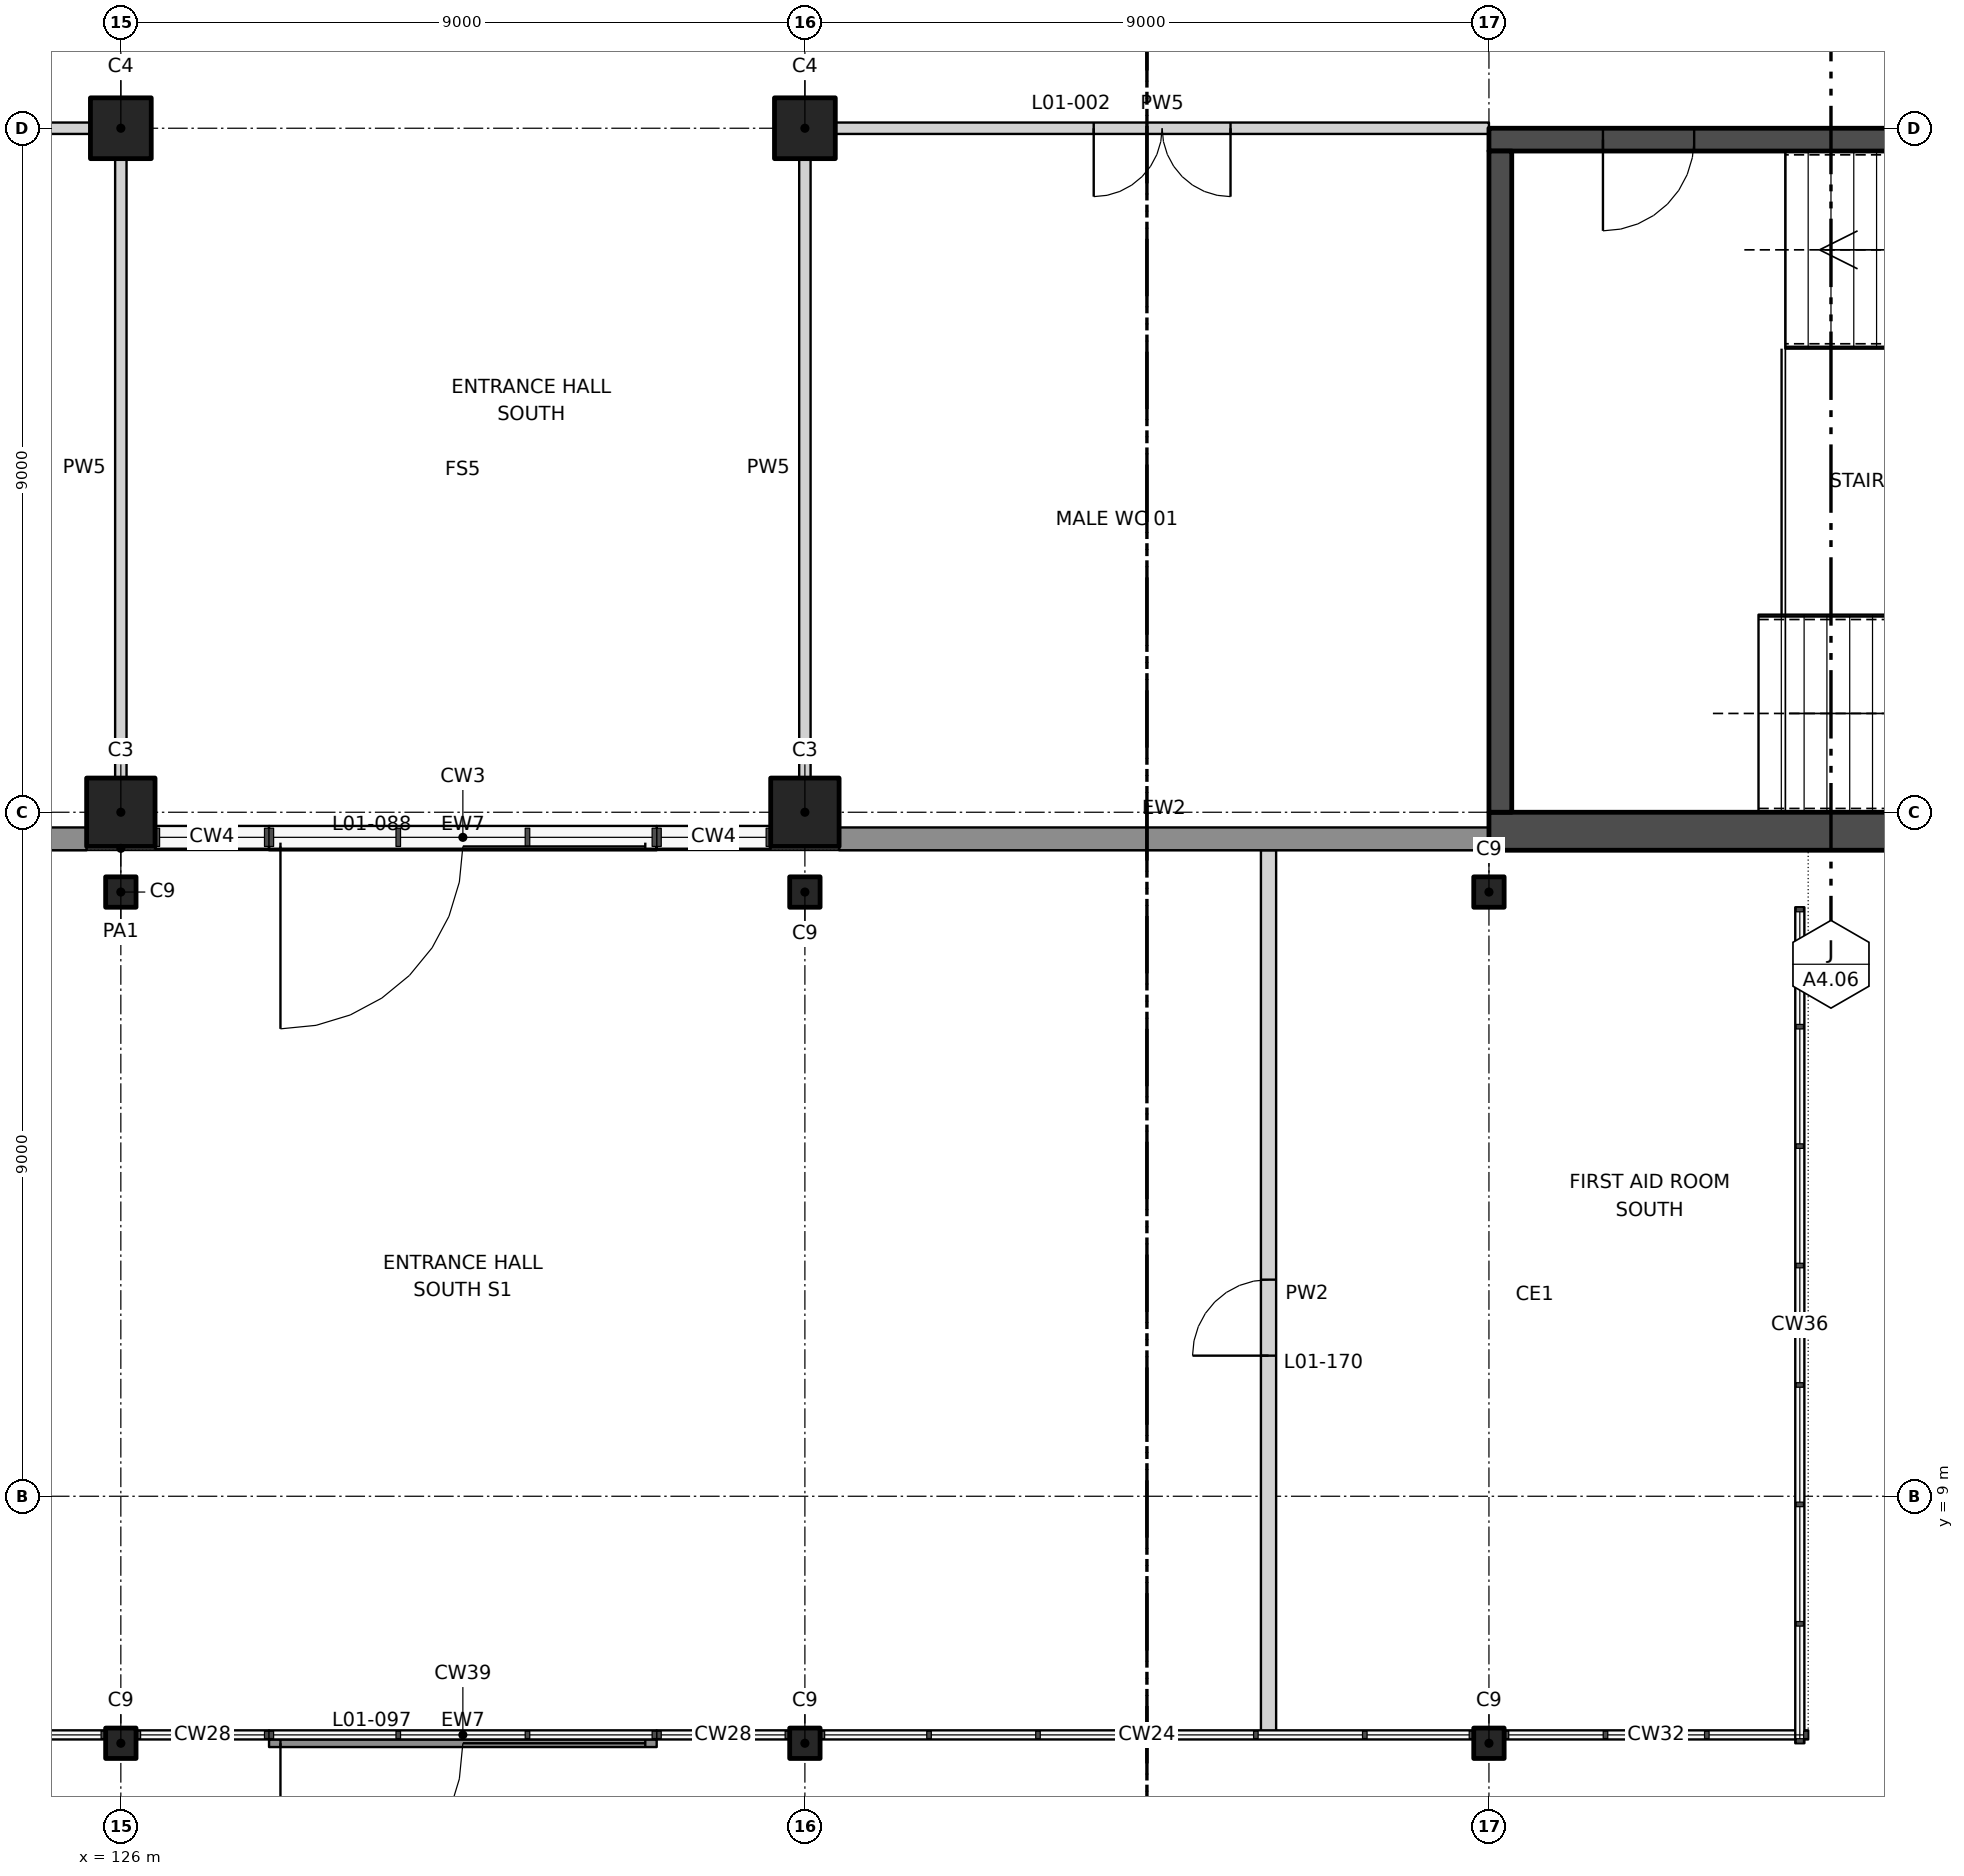
"""IFC4 building model, lengths in metres.
Left out: names, types, materials, properties, quantities, classifications, styles, units other than length and angle.
Written with IfcOpenShell. Run it as: python <this file> out.ifc"""

import sys

from ifc_helpers import new_model, si_unit, direction, frame, frame_2d, origin, origin_2d, place, context, subcontext, project, spatial, rectangle, hollow_rectangle, extrude, element, fill, save


model = new_model("IFC4")
c1 = context("Model", 3, precision=1e-05, world=origin(), true_north=direction((0.0, 1.0)))
c2 = subcontext(c1, "Body", "Model", "MODEL_VIEW")
j1 = project(units=[si_unit("LENGTHUNIT", "METRE"), si_unit("PLANEANGLEUNIT", "RADIAN")], contexts=[c1])
p1 = place(None, origin())
s1 = spatial("IfcSite", under=j1, at=p1, CompositionType="ELEMENT")
p2 = place(p1, origin())
s2 = spatial("IfcBuilding", under=s1, at=p2, CompositionType="ELEMENT")
p3 = place(p2, frame((0.0, 0.0, 7.0)))
s3 = spatial("IfcBuildingStorey", under=s2, at=p3, CompositionType="ELEMENT", Elevation=7.0)
for number, where, z_axis, x_axis in (
    (1, (126.0, 18.0, 0.0), (0.0, 0.0, 1.0), (1.0, 0.0, 0.0)),
    (2, (135.0, 18.0, 0.0), (0.0, 0.0, 1.0), (1.0, 0.0, 0.0)),
):
    element("IfcColumn", number, at=place(p3, frame(where, z_axis=z_axis, x_axis=x_axis)), inside=s3, PredefinedType="COLUMN", context=c2, shape_type="SweptSolid", body=[
        extrude(rectangle(XDim=0.9, YDim=0.9, at=origin_2d()), origin(), (0.0, 0.0, 1.0), 4.5),
    ])
for number, where, z_axis, x_axis in (
    (3, (126.0, 27.0, 0.0), (0.0, 0.0, 1.0), (1.0, 0.0, 0.0)),
    (4, (135.0, 27.0, 0.0), (0.0, 0.0, 1.0), (1.0, 0.0, 0.0)),
):
    element("IfcColumn", number, at=place(p3, frame(where, z_axis=z_axis, x_axis=x_axis)), inside=s3, PredefinedType="COLUMN", context=c2, shape_type="SweptSolid", body=[
        extrude(rectangle(XDim=0.8, YDim=0.8, at=origin_2d()), origin(), (0.0, 0.0, 1.0), 4.5),
    ])
p4 = place(p3, frame((117.3, 27.0, 0.0), z_axis=(0.0, 0.0, 1.0), x_axis=(1.0, 0.0, 0.0)))
e5 = element("IfcWall", 5, at=p4, inside=s3, PredefinedType="PARTITIONING", context=c2, shape_type="SweptSolid", body=[
    extrude(rectangle(XDim=8.3, YDim=0.15, at=frame_2d((4.15, 0.0))), origin(), (0.0, 0.0, 1.0), 3.25),
])
p5 = place(p4, frame((3.1, 0.0, 0.0)))
e6 = element("IfcOpeningElement", 6, at=p5, cuts=e5, PredefinedType="OPENING", context=c2, shape_type="SweptSolid", body=[
    extrude(rectangle(XDim=1.8, YDim=2.1, at=frame_2d((0.9, 1.05))), frame((0.0, 0.085, 0.0), z_axis=(0.0, -1.0, 0.0), x_axis=(1.0, 0.0, 0.0)), (0.0, 0.0, 1.0), 0.17),
])
p6 = place(p3, frame((135.4, 27.0, 0.0), z_axis=(0.0, 0.0, 1.0), x_axis=(1.0, 0.0, 0.0)))
e7 = element("IfcWall", 7, at=p6, inside=s3, PredefinedType="PARTITIONING", context=c2, shape_type="SweptSolid", body=[
    extrude(rectangle(XDim=8.6, YDim=0.15, at=frame_2d((4.3, 0.0))), origin(), (0.0, 0.0, 1.0), 3.25),
])
p7 = place(p6, frame((3.4, 0.0, 0.0)))
e8 = element("IfcOpeningElement", 8, at=p7, cuts=e7, PredefinedType="OPENING", context=c2, shape_type="SweptSolid", body=[
    extrude(rectangle(XDim=1.8, YDim=2.1, at=frame_2d((0.9, 1.05))), frame((0.0, 0.085, 0.0), z_axis=(0.0, -1.0, 0.0), x_axis=(1.0, 0.0, 0.0)), (0.0, 0.0, 1.0), 0.17),
])
for number, where, z_axis, x_axis in (
    (9, (126.0, 18.45, 0.0), (0.0, 0.0, 1.0), (0.0, 1.0, 0.0)),
    (10, (135.0, 18.45, 0.0), (0.0, 0.0, 1.0), (0.0, 1.0, 0.0)),
):
    element("IfcWall", number, at=place(p3, frame(where, z_axis=z_axis, x_axis=x_axis)), inside=s3, PredefinedType="PARTITIONING", context=c2, shape_type="SweptSolid", body=[
        extrude(rectangle(XDim=8.15, YDim=0.15, at=frame_2d((4.075, 0.0))), origin(), (0.0, 0.0, 1.0), 3.25),
    ])
p8 = place(p3, frame((117.0, 17.65, 0.0), z_axis=(0.0, 0.0, 1.0), x_axis=(1.0, 0.0, 0.0)))
e11 = element("IfcWall", 11, at=p8, inside=s3, PredefinedType="SOLIDWALL", context=c2, shape_type="SweptSolid", body=[
    extrude(rectangle(XDim=8.55, YDim=0.3, at=frame_2d((4.275, 0.0))), origin(), (0.0, 0.0, 1.0), 4.5),
])
p9 = place(p3, frame((127.95, 17.55, 0.0), z_axis=(0.0, 0.0, 1.0), x_axis=(1.0, 0.0, 0.0)))
e12 = element("IfcWall", 12, at=p9, inside=s3, PredefinedType="SOLIDWALL", context=c2, shape_type="SweptSolid", body=[
    extrude(rectangle(XDim=5.1, YDim=0.1, at=frame_2d((2.55, 0.0))), origin(), (0.0, 0.0, 1.0), 3.1),
])
p10 = place(p9, frame((0.15, 0.0, 0.0)))
e13 = element("IfcOpeningElement", 13, at=p10, cuts=e12, PredefinedType="OPENING", context=c2, shape_type="SweptSolid", body=[
    extrude(rectangle(XDim=4.8, YDim=2.7, at=frame_2d((2.4, 1.35))), frame((0.0, 0.06, 0.0), z_axis=(0.0, -1.0, 0.0), x_axis=(1.0, 0.0, 0.0)), (0.0, 0.0, 1.0), 0.12),
])
p11 = place(p3, frame((135.45, 17.65, 0.0), z_axis=(0.0, 0.0, 1.0), x_axis=(1.0, 0.0, 0.0)))
e14 = element("IfcWall", 14, at=p11, inside=s3, PredefinedType="SOLIDWALL", context=c2, shape_type="SweptSolid", body=[
    extrude(rectangle(XDim=8.55, YDim=0.3, at=frame_2d((4.275, 0.0))), origin(), (0.0, 0.0, 1.0), 4.5),
])
for number, where, z_axis, x_axis in (
    (15, (126.0, 5.75, 0.0), (0.0, 0.0, 1.0), (1.0, 0.0, 0.0)),
    (16, (126.0, 16.95, 0.0), (0.0, 0.0, 1.0), (1.0, 0.0, 0.0)),
    (17, (135.0, 5.75, 0.0), (0.0, 0.0, 1.0), (1.0, 0.0, 0.0)),
    (18, (135.0, 16.95, 0.0), (0.0, 0.0, 1.0), (1.0, 0.0, 0.0)),
    (19, (144.0, 5.75, 0.0), (0.0, 0.0, 1.0), (1.0, 0.0, 0.0)),
    (20, (144.0, 16.95, 0.0), (0.0, 0.0, 1.0), (1.0, 0.0, 0.0)),
):
    element("IfcColumn", number, at=place(p3, frame(where, z_axis=z_axis, x_axis=x_axis)), inside=s3, PredefinedType="COLUMN", context=c2, shape_type="SweptSolid", body=[
        extrude(hollow_rectangle(XDim=0.4, YDim=0.4, WallThickness=0.016, at=origin_2d()), origin(), (0.0, 0.0, 1.0), 4.5),
    ])
p12 = place(p3, frame((127.95, 5.75, 0.0), z_axis=(0.0, 0.0, 1.0), x_axis=(1.0, 0.0, 0.0)))
e21 = element("IfcWall", 21, at=p12, inside=s3, PredefinedType="SOLIDWALL", context=c2, shape_type="SweptSolid", body=[
    extrude(rectangle(XDim=5.1, YDim=0.1, at=frame_2d((2.55, 0.0))), origin(), (0.0, 0.0, 1.0), 3.1),
])
p13 = place(p12, frame((0.15, 0.0, 0.0)))
e22 = element("IfcOpeningElement", 22, at=p13, cuts=e21, PredefinedType="OPENING", context=c2, shape_type="SweptSolid", body=[
    extrude(rectangle(XDim=4.8, YDim=2.7, at=frame_2d((2.4, 1.35))), frame((0.0, 0.06, 0.0), z_axis=(0.0, -1.0, 0.0), x_axis=(1.0, 0.0, 0.0)), (0.0, 0.0, 1.0), 0.12),
])
p14 = place(p3, frame((144.0, 26.85, 0.0), z_axis=(0.0, 0.0, 1.0), x_axis=(1.0, 0.0, 0.0)))
e23 = element("IfcWall", 23, at=p14, inside=s3, PredefinedType="SHEAR", context=c2, shape_type="SweptSolid", body=[
    extrude(rectangle(XDim=18.0, YDim=0.3, at=frame_2d((9.0, 0.0))), origin(), (0.0, 0.0, 1.0), 4.5),
])
p15 = place(p14, frame((1.5, 0.0, 0.0)))
e24 = element("IfcOpeningElement", 24, at=p15, cuts=e23, PredefinedType="OPENING", context=c2, shape_type="SweptSolid", body=[
    extrude(rectangle(XDim=1.2, YDim=2.1, at=frame_2d((0.6, 1.05))), frame((0.0, 0.16, 0.0), z_axis=(0.0, -1.0, 0.0), x_axis=(1.0, 0.0, 0.0)), (0.0, 0.0, 1.0), 0.32),
])
p16 = place(p3, frame((144.0, 17.75, 0.0), z_axis=(0.0, 0.0, 1.0), x_axis=(1.0, 0.0, 0.0)))
e25 = element("IfcWall", 25, at=p16, inside=s3, PredefinedType="SHEAR", context=c2, shape_type="SweptSolid", body=[
    extrude(rectangle(XDim=18.0, YDim=0.5, at=frame_2d((9.0, 0.0))), origin(), (0.0, 0.0, 1.0), 4.5),
])
p17 = place(p3, frame((144.15, 26.7, 0.0), z_axis=(0.0, 0.0, 1.0), x_axis=(0.0, -1.0, 0.0)))
e26 = element("IfcWall", 26, at=p17, inside=s3, PredefinedType="SHEAR", context=c2, shape_type="SweptSolid", body=[
    extrude(rectangle(XDim=8.7, YDim=0.3, at=frame_2d((4.35, 0.0))), origin(), (0.0, 0.0, 1.0), 4.5),
])
p18 = place(p3, frame((141.1, 5.81, 0.0), z_axis=(0.0, 0.0, 1.0), x_axis=(0.0, 1.0, 0.0)))
e27 = element("IfcWall", 27, at=p18, inside=s3, PredefinedType="PARTITIONING", context=c2, shape_type="SweptSolid", body=[
    extrude(rectangle(XDim=11.69, YDim=0.2, at=frame_2d((5.845, 0.0))), origin(), (0.0, 0.0, 1.0), 3.983),
])
p19 = place(p18, frame((5.04, 0.0, 0.0)))
e28 = element("IfcOpeningElement", 28, at=p19, cuts=e27, PredefinedType="OPENING", context=c2, shape_type="SweptSolid", body=[
    extrude(rectangle(XDim=1.0, YDim=2.1, at=frame_2d((0.5, 1.05))), frame((0.0, 0.11, 0.0), z_axis=(0.0, -1.0, 0.0), x_axis=(1.0, 0.0, 0.0)), (0.0, 0.0, 1.0), 0.22),
])
p20 = place(p7, frame((1.8, 0.0, 0.0), z_axis=(0.0, 0.0, 1.0), x_axis=(-1.0, 0.0, 0.0)))
e29 = element("IfcDoor", 29, at=p20, inside=s3, OperationType="DOUBLE_DOOR_DOUBLE_SWING", PredefinedType="DOOR", context=c2, shape_type="SweptSolid", body=[
    extrude(rectangle(XDim=1.8, YDim=2.1, at=frame_2d((0.9, 1.05))), frame((0.0, 0.025, 0.0), z_axis=(0.0, -1.0, 0.0), x_axis=(1.0, 0.0, 0.0)), (0.0, 0.0, 1.0), 0.05),
])
fill(e8, e29)
p21 = place(p10, frame((4.8, 0.0, 0.0), z_axis=(0.0, 0.0, 1.0), x_axis=(-1.0, 0.0, 0.0)))
e30 = element("IfcDoor", 30, at=p21, inside=s3, OperationType="DOUBLE_DOOR_SINGLE_SWING", PredefinedType="DOOR", context=c2, shape_type="SweptSolid", body=[
    extrude(rectangle(XDim=4.8, YDim=2.7, at=frame_2d((2.4, 1.35))), frame((0.0, 0.025, 0.0), z_axis=(0.0, -1.0, 0.0), x_axis=(1.0, 0.0, 0.0)), (0.0, 0.0, 1.0), 0.05),
])
fill(e13, e30)
p22 = place(p13, frame((4.8, 0.0, 0.0), z_axis=(0.0, 0.0, 1.0), x_axis=(-1.0, 0.0, 0.0)))
e31 = element("IfcDoor", 31, at=p22, inside=s3, OperationType="DOUBLE_DOOR_SINGLE_SWING", PredefinedType="DOOR", context=c2, shape_type="SweptSolid", body=[
    extrude(rectangle(XDim=4.8, YDim=2.7, at=frame_2d((2.4, 1.35))), frame((0.0, 0.025, 0.0), z_axis=(0.0, -1.0, 0.0), x_axis=(1.0, 0.0, 0.0)), (0.0, 0.0, 1.0), 0.05),
])
fill(e22, e31)
p23 = place(p15, frame((1.2, 0.0, 0.0), z_axis=(0.0, 0.0, 1.0), x_axis=(-1.0, 0.0, 0.0)))
e32 = element("IfcDoor", 32, at=p23, inside=s3, OperationType="SINGLE_SWING_RIGHT", PredefinedType="DOOR", context=c2, shape_type="SweptSolid", body=[
    extrude(rectangle(XDim=1.2, YDim=2.1, at=frame_2d((0.6, 1.05))), frame((0.0, 0.025, 0.0), z_axis=(0.0, -1.0, 0.0), x_axis=(1.0, 0.0, 0.0)), (0.0, 0.0, 1.0), 0.05),
])
fill(e24, e32)
p24 = place(p19, origin())
e33 = element("IfcDoor", 33, at=p24, inside=s3, OperationType="SINGLE_SWING_LEFT", PredefinedType="DOOR", context=c2, shape_type="SweptSolid", body=[
    extrude(rectangle(XDim=1.0, YDim=2.1, at=frame_2d((0.5, 1.05))), frame((0.0, 0.025, 0.0), z_axis=(0.0, -1.0, 0.0), x_axis=(1.0, 0.0, 0.0)), (0.0, 0.0, 1.0), 0.05),
])
fill(e28, e33)
save(model, sys.argv[1])
